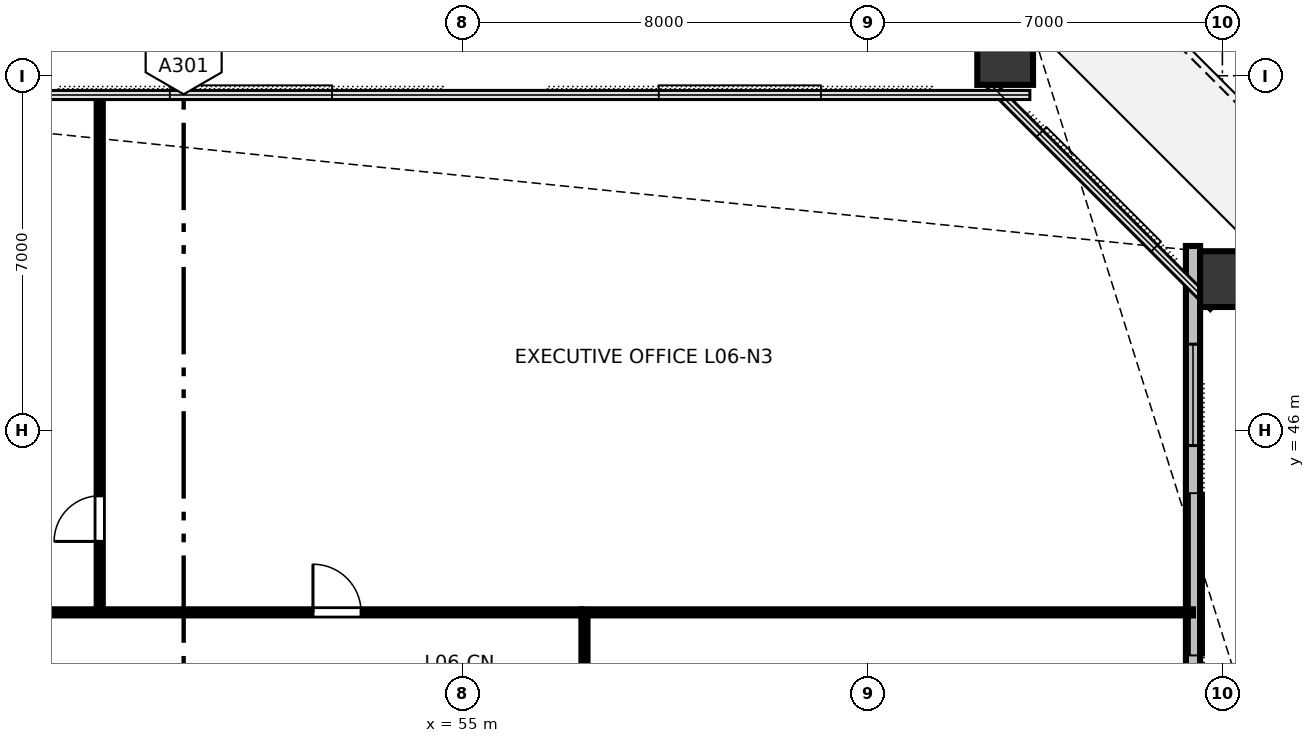
"""IFC4 building model, lengths in metres.
Left out: names, types, materials, properties, quantities, classifications, styles, units other than length and angle.
Written with IfcOpenShell. Run it as: python <this file> out.ifc"""

import sys

from ifc_helpers import new_model, si_unit, direction, frame, frame_2d, origin, origin_2d, place, context, subcontext, project, spatial, rectangle, hollow_rectangle, extrude, element, fill, save


model = new_model("IFC4")
c1 = context("Model", 3, precision=1e-05, world=origin(), true_north=direction((0.0, 1.0)))
c2 = subcontext(c1, "Body", "Model", "MODEL_VIEW")
j1 = project(units=[si_unit("LENGTHUNIT", "METRE"), si_unit("PLANEANGLEUNIT", "RADIAN")], contexts=[c1])
p1 = place(None, origin())
s1 = spatial("IfcSite", under=j1, at=p1, CompositionType="ELEMENT")
p2 = place(p1, origin())
s2 = spatial("IfcBuilding", under=s1, at=p2, CompositionType="ELEMENT")
p3 = place(p2, frame((0.0, 0.0, 28.0)))
s3 = spatial("IfcBuildingStorey", under=s2, at=p3, CompositionType="ELEMENT", Elevation=28.0)
for number, where, z_axis, x_axis in (
    (1, (70.211, 48.987, 0.0), (0.0, 0.0, 1.0), (0.0, 1.0, 0.0)),
    (2, (65.713, 53.469, 0.0), (0.0, 0.0, 1.0), (1.0, 0.0, 0.0)),
):
    element("IfcColumn", number, at=place(p3, frame(where, z_axis=z_axis, x_axis=x_axis)), inside=s3, PredefinedType="COLUMN", context=c2, shape_type="SweptSolid", body=[
        extrude(hollow_rectangle(XDim=1.1, YDim=1.3, WallThickness=0.07, at=origin_2d()), origin(), (0.0, 0.0, 1.0), 3.358),
    ])
p4 = place(p3, frame((69.42, 14.36, 0.0), z_axis=(0.0, 0.0, 1.0), x_axis=(0.0, 1.0, 0.0)))
e3 = element("IfcWall", 3, at=p4, inside=s3, PredefinedType="STANDARD", context=c2, shape_type="SweptSolid", body=[
    extrude(rectangle(XDim=35.28, YDim=0.28, at=frame_2d((17.64, 0.0))), origin(), (0.0, 0.0, 1.0), 3.36),
])
p5 = place(p4, frame((22.04, 0.0, 0.0)))
e4 = element("IfcOpeningElement", 4, at=p5, cuts=e3, PredefinedType="OPENING", context=c2, shape_type="SweptSolid", body=[
    extrude(rectangle(XDim=1.6, YDim=2.15, at=frame_2d((0.8, 1.075))), frame((0.0, 0.15, 0.0), z_axis=(0.0, -1.0, 0.0), x_axis=(1.0, 0.0, 0.0)), (0.0, 0.0, 1.0), 0.3),
])
p6 = place(p4, frame((1.938, 0.0, 0.8)))
e5 = element("IfcOpeningElement", 5, at=p6, cuts=e3, PredefinedType="OPENING", context=c2, shape_type="SweptSolid", body=[
    extrude(rectangle(XDim=2.0, YDim=1.95, at=frame_2d((1.0, 0.975))), frame((0.0, 0.15, 0.0), z_axis=(0.0, -1.0, 0.0), x_axis=(1.0, 0.0, 0.0)), (0.0, 0.0, 1.0), 0.3),
])
p7 = place(p4, frame((9.289, 0.0, 0.8)))
e6 = element("IfcOpeningElement", 6, at=p7, cuts=e3, PredefinedType="OPENING", context=c2, shape_type="SweptSolid", body=[
    extrude(rectangle(XDim=2.0, YDim=1.95, at=frame_2d((1.0, 0.975))), frame((0.0, 0.15, 0.0), z_axis=(0.0, -1.0, 0.0), x_axis=(1.0, 0.0, 0.0)), (0.0, 0.0, 1.0), 0.3),
])
p8 = place(p4, frame((12.964, 0.0, 0.8)))
e7 = element("IfcOpeningElement", 7, at=p8, cuts=e3, PredefinedType="OPENING", context=c2, shape_type="SweptSolid", body=[
    extrude(rectangle(XDim=2.0, YDim=1.95, at=frame_2d((1.0, 0.975))), frame((0.0, 0.15, 0.0), z_axis=(0.0, -1.0, 0.0), x_axis=(1.0, 0.0, 0.0)), (0.0, 0.0, 1.0), 0.3),
])
p9 = place(p4, frame((31.342, 0.0, 0.8)))
e8 = element("IfcOpeningElement", 8, at=p9, cuts=e3, PredefinedType="OPENING", context=c2, shape_type="SweptSolid", body=[
    extrude(rectangle(XDim=2.0, YDim=1.95, at=frame_2d((1.0, 0.975))), frame((0.0, 0.15, 0.0), z_axis=(0.0, -1.0, 0.0), x_axis=(1.0, 0.0, 0.0)), (0.0, 0.0, 1.0), 0.3),
])
p10 = place(p3, frame((47.844, 42.41, 0.0), z_axis=(0.0, 0.0, 1.0), x_axis=(0.0, 1.0, 0.0)))
e9 = element("IfcWall", 9, at=p10, inside=s3, PredefinedType="PARTITIONING", context=c2, shape_type="SweptSolid", body=[
    extrude(rectangle(XDim=10.21, YDim=0.12, at=frame_2d((5.105, 0.0))), origin(), (0.0, 0.0, 1.0), 2.64),
])
p11 = place(p10, frame((1.4, 0.0, 0.0)))
e10 = element("IfcOpeningElement", 10, at=p11, cuts=e9, PredefinedType="OPENING", context=c2, shape_type="SweptSolid", body=[
    extrude(rectangle(XDim=0.9, YDim=2.15, at=frame_2d((0.45, 1.075))), frame((0.0, 0.07, 0.0), z_axis=(0.0, -1.0, 0.0), x_axis=(1.0, 0.0, 0.0)), (0.0, 0.0, 1.0), 0.14),
])
p12 = place(p3, frame((34.65, 42.41, 0.0), z_axis=(0.0, 0.0, 1.0), x_axis=(1.0, 0.0, 0.0)))
e11 = element("IfcWall", 11, at=p12, inside=s3, PredefinedType="PARTITIONING", context=c2, shape_type="SweptSolid", body=[
    extrude(rectangle(XDim=22.7, YDim=0.12, at=frame_2d((11.35, 0.0))), origin(), (0.0, 0.0, 1.0), 2.64),
])
p13 = place(p12, frame((3.981, 0.0, 0.0)))
e12 = element("IfcOpeningElement", 12, at=p13, cuts=e11, PredefinedType="OPENING", context=c2, shape_type="SweptSolid", body=[
    extrude(rectangle(XDim=0.95, YDim=2.15, at=frame_2d((0.475, 1.075))), frame((0.0, 0.07, 0.0), z_axis=(0.0, -1.0, 0.0), x_axis=(1.0, 0.0, 0.0)), (0.0, 0.0, 1.0), 0.14),
])
p14 = place(p12, frame((10.508, 0.0, 0.0)))
e13 = element("IfcOpeningElement", 13, at=p14, cuts=e11, PredefinedType="OPENING", context=c2, shape_type="SweptSolid", body=[
    extrude(rectangle(XDim=0.95, YDim=2.15, at=frame_2d((0.475, 1.075))), frame((0.0, 0.07, 0.0), z_axis=(0.0, -1.0, 0.0), x_axis=(1.0, 0.0, 0.0)), (0.0, 0.0, 1.0), 0.14),
])
p15 = place(p12, frame((17.402, 0.0, 0.0)))
e14 = element("IfcOpeningElement", 14, at=p15, cuts=e11, PredefinedType="OPENING", context=c2, shape_type="SweptSolid", body=[
    extrude(rectangle(XDim=0.95, YDim=2.15, at=frame_2d((0.475, 1.075))), frame((0.0, 0.07, 0.0), z_axis=(0.0, -1.0, 0.0), x_axis=(1.0, 0.0, 0.0)), (0.0, 0.0, 1.0), 0.14),
])
p16 = place(p3, frame((57.41, 21.65, 0.0), z_axis=(0.0, 0.0, 1.0), x_axis=(0.0, 1.0, 0.0)))
e15 = element("IfcWall", 15, at=p16, inside=s3, PredefinedType="PARTITIONING", context=c2, shape_type="SweptSolid", body=[
    extrude(rectangle(XDim=20.7, YDim=0.12, at=frame_2d((10.35, 0.0))), origin(), (0.0, 0.0, 1.0), 2.64),
])
p17 = place(p16, frame((5.31, 0.0, 0.0)))
e16 = element("IfcOpeningElement", 16, at=p17, cuts=e15, PredefinedType="OPENING", context=c2, shape_type="SweptSolid", body=[
    extrude(rectangle(XDim=0.95, YDim=2.15, at=frame_2d((0.475, 1.075))), frame((0.0, 0.07, 0.0), z_axis=(0.0, -1.0, 0.0), x_axis=(1.0, 0.0, 0.0)), (0.0, 0.0, 1.0), 0.14),
])
p18 = place(p16, frame((15.459, 0.0, 0.0)))
e17 = element("IfcOpeningElement", 17, at=p18, cuts=e15, PredefinedType="OPENING", context=c2, shape_type="SweptSolid", body=[
    extrude(rectangle(XDim=0.95, YDim=2.15, at=frame_2d((0.475, 1.075))), frame((0.0, 0.07, 0.0), z_axis=(0.0, -1.0, 0.0), x_axis=(1.0, 0.0, 0.0)), (0.0, 0.0, 1.0), 0.14),
])
p19 = place(p3, frame((57.35, 42.41, 0.0), z_axis=(0.0, 0.0, 1.0), x_axis=(1.0, 0.0, 0.0)))
e18 = element("IfcWall", 18, at=p19, inside=s3, PredefinedType="PARTITIONING", context=c2, shape_type="SweptSolid", body=[
    extrude(rectangle(XDim=12.07, YDim=0.12, at=frame_2d((6.035, 0.0))), origin(), (0.0, 0.0, 1.0), 2.64),
])
p20 = place(p9, origin())
e19 = element("IfcWindow", 19, at=p20, inside=s3, PartitioningType="SINGLE_PANEL", PredefinedType="WINDOW", context=c2, shape_type="SweptSolid", body=[
    extrude(rectangle(XDim=2.0, YDim=1.95, at=frame_2d((1.0, 0.975))), frame((0.0, 0.03, 0.0), z_axis=(0.0, -1.0, 0.0), x_axis=(1.0, 0.0, 0.0)), (0.0, 0.0, 1.0), 0.06),
])
fill(e8, e19)
p21 = place(p11, origin())
e20 = element("IfcDoor", 20, at=p21, inside=s3, OperationType="SINGLE_SWING_LEFT", PredefinedType="DOOR", context=c2, shape_type="SweptSolid", body=[
    extrude(rectangle(XDim=0.9, YDim=2.15, at=frame_2d((0.45, 1.075))), frame((0.0, 0.025, 0.0), z_axis=(0.0, -1.0, 0.0), x_axis=(1.0, 0.0, 0.0)), (0.0, 0.0, 1.0), 0.05),
])
fill(e10, e20)
p22 = place(p15, origin())
e21 = element("IfcDoor", 21, at=p22, inside=s3, OperationType="SINGLE_SWING_LEFT", PredefinedType="DOOR", context=c2, shape_type="SweptSolid", body=[
    extrude(rectangle(XDim=0.95, YDim=2.15, at=frame_2d((0.475, 1.075))), frame((0.0, 0.025, 0.0), z_axis=(0.0, -1.0, 0.0), x_axis=(1.0, 0.0, 0.0)), (0.0, 0.0, 1.0), 0.05),
])
fill(e14, e21)
save(model, sys.argv[1])
